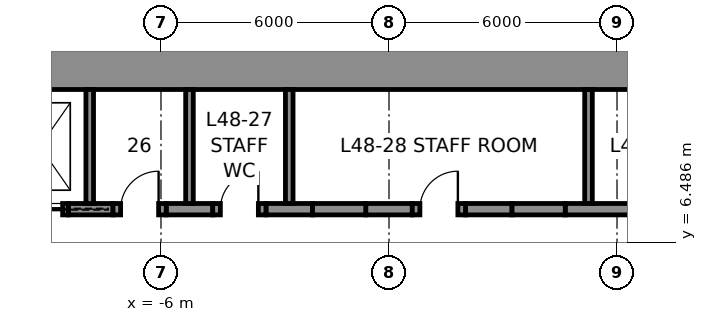
"""IFC4 building model, lengths in metres.
Left out: names, types, materials, properties, quantities, classifications, styles, units other than length and angle.
Written with IfcOpenShell. Run it as: python <this file> out.ifc"""

import sys

from ifc_helpers import new_model, si_unit, direction, frame, frame_2d, origin, place, context, subcontext, project, spatial, rectangle, extrude, element, fill, save


model = new_model("IFC4")
c1 = context("Model", 3, precision=1e-05, world=origin(), true_north=direction((0.0, 1.0)))
c2 = subcontext(c1, "Body", "Model", "MODEL_VIEW")
j1 = project(units=[si_unit("LENGTHUNIT", "METRE"), si_unit("PLANEANGLEUNIT", "RADIAN")], contexts=[c1])
p1 = place(None, origin())
s1 = spatial("IfcSite", under=j1, at=p1, CompositionType="ELEMENT")
p2 = place(p1, origin())
s2 = spatial("IfcBuilding", under=s1, at=p2, CompositionType="ELEMENT")
p3 = place(p2, frame((0.0, 0.0, 221.8)))
s3 = spatial("IfcBuildingStorey", under=s2, at=p3, CompositionType="ELEMENT", Elevation=221.8)
p4 = place(p3, frame((-12.0, 11.25, 0.0), z_axis=(0.0, 0.0, 1.0), x_axis=(1.0, 0.0, 0.0)))
e1 = element("IfcWall", 1, at=p4, inside=s3, PredefinedType="SHEAR", context=c2, shape_type="SweptSolid", body=[
    extrude(rectangle(XDim=24.0, YDim=1.5, at=frame_2d((12.0, 0.0))), origin(), (0.0, 0.0, 1.0), 4.0),
])
p5 = place(p3, frame((-8.438, 7.35, 0.0), z_axis=(0.0, 0.0, 1.0), x_axis=(1.0, 0.0, 0.0)))
e2 = element("IfcWall", 2, at=p5, inside=s3, PredefinedType="SHEAR", context=c2, shape_type="SweptSolid", body=[
    extrude(rectangle(XDim=1.175, YDim=0.3, at=frame_2d((0.587, 0.0))), origin(), (0.0, 0.0, 1.0), 4.0),
])
for number, where, z_axis, x_axis in (
    (3, (-5.863, 7.35, 0.0), (0.0, 0.0, 1.0), (1.0, 0.0, 0.0)),
    (4, (-3.238, 7.35, 0.0), (0.0, 0.0, 1.0), (1.0, 0.0, 0.0)),
    (5, (-0.613, 7.35, 0.0), (0.0, 0.0, 1.0), (1.0, 0.0, 0.0)),
    (6, (2.012, 7.35, 0.0), (0.0, 0.0, 1.0), (1.0, 0.0, 0.0)),
):
    element("IfcWall", number, at=place(p3, frame(where, z_axis=z_axis, x_axis=x_axis)), inside=s3, PredefinedType="SHEAR", context=c2, shape_type="SweptSolid", body=[
        extrude(rectangle(XDim=1.225, YDim=0.3, at=frame_2d((0.613, 0.0))), origin(), (0.0, 0.0, 1.0), 4.0),
    ])
p6 = place(p3, frame((4.637, 7.35, 0.0), z_axis=(0.0, 0.0, 1.0), x_axis=(1.0, 0.0, 0.0)))
e7 = element("IfcWall", 7, at=p6, inside=s3, PredefinedType="SHEAR", context=c2, shape_type="SweptSolid", body=[
    extrude(rectangle(XDim=1.887, YDim=0.3, at=frame_2d((0.944, 0.0))), origin(), (0.0, 0.0, 1.0), 4.0),
])
p7 = place(p3, frame((-9.938, 7.35, 0.0), z_axis=(0.0, 0.0, 1.0), x_axis=(1.0, 0.0, 0.0)))
e8 = element("IfcWall", 8, at=p7, inside=s3, PredefinedType="PARTITIONING", context=c2, shape_type="SweptSolid", body=[
    extrude(rectangle(XDim=1.5, YDim=0.3, at=frame_2d((0.75, 0.0))), origin(), (0.0, 0.0, 1.0), 4.0),
])
p8 = place(p7, frame((0.15, 0.0, 0.0)))
e9 = element("IfcOpeningElement", 9, at=p8, cuts=e8, PredefinedType="OPENING", context=c2, shape_type="SweptSolid", body=[
    extrude(rectangle(XDim=1.2, YDim=2.3, at=frame_2d((0.6, 1.15))), frame((0.0, 0.16, 0.0), z_axis=(0.0, -1.0, 0.0), x_axis=(1.0, 0.0, 0.0)), (0.0, 0.0, 1.0), 0.32),
])
p9 = place(p3, frame((-7.262, 7.35, 0.0), z_axis=(0.0, 0.0, 1.0), x_axis=(1.0, 0.0, 0.0)))
e10 = element("IfcWall", 10, at=p9, inside=s3, PredefinedType="PARTITIONING", context=c2, shape_type="SweptSolid", body=[
    extrude(rectangle(XDim=1.4, YDim=0.3, at=frame_2d((0.7, 0.0))), origin(), (0.0, 0.0, 1.0), 4.0),
])
p10 = place(p9, frame((0.2, 0.0, 0.0)))
e11 = element("IfcOpeningElement", 11, at=p10, cuts=e10, PredefinedType="OPENING", context=c2, shape_type="SweptSolid", body=[
    extrude(rectangle(XDim=1.0, YDim=2.3, at=frame_2d((0.5, 1.15))), frame((0.0, 0.16, 0.0), z_axis=(0.0, -1.0, 0.0), x_axis=(1.0, 0.0, 0.0)), (0.0, 0.0, 1.0), 0.32),
])
p11 = place(p3, frame((-4.637, 7.35, 0.0), z_axis=(0.0, 0.0, 1.0), x_axis=(1.0, 0.0, 0.0)))
e12 = element("IfcWall", 12, at=p11, inside=s3, PredefinedType="PARTITIONING", context=c2, shape_type="SweptSolid", body=[
    extrude(rectangle(XDim=1.4, YDim=0.3, at=frame_2d((0.7, 0.0))), origin(), (0.0, 0.0, 1.0), 4.0),
])
p12 = place(p11, frame((0.2, 0.0, 0.0)))
e13 = element("IfcOpeningElement", 13, at=p12, cuts=e12, PredefinedType="OPENING", context=c2, shape_type="SweptSolid", body=[
    extrude(rectangle(XDim=1.0, YDim=2.3, at=frame_2d((0.5, 1.15))), frame((0.0, 0.16, 0.0), z_axis=(0.0, -1.0, 0.0), x_axis=(1.0, 0.0, 0.0)), (0.0, 0.0, 1.0), 0.32),
])
p13 = place(p3, frame((-2.012, 7.35, 0.0), z_axis=(0.0, 0.0, 1.0), x_axis=(1.0, 0.0, 0.0)))
e14 = element("IfcWall", 14, at=p13, inside=s3, PredefinedType="PARTITIONING", context=c2, shape_type="SweptSolid", body=[
    extrude(rectangle(XDim=1.4, YDim=0.3, at=frame_2d((0.7, 0.0))), origin(), (0.0, 0.0, 1.0), 4.0),
])
p14 = place(p3, frame((0.613, 7.35, 0.0), z_axis=(0.0, 0.0, 1.0), x_axis=(1.0, 0.0, 0.0)))
e15 = element("IfcWall", 15, at=p14, inside=s3, PredefinedType="PARTITIONING", context=c2, shape_type="SweptSolid", body=[
    extrude(rectangle(XDim=1.4, YDim=0.3, at=frame_2d((0.7, 0.0))), origin(), (0.0, 0.0, 1.0), 4.0),
])
p15 = place(p14, frame((0.2, 0.0, 0.0)))
e16 = element("IfcOpeningElement", 16, at=p15, cuts=e15, PredefinedType="OPENING", context=c2, shape_type="SweptSolid", body=[
    extrude(rectangle(XDim=1.0, YDim=2.3, at=frame_2d((0.5, 1.15))), frame((0.0, 0.16, 0.0), z_axis=(0.0, -1.0, 0.0), x_axis=(1.0, 0.0, 0.0)), (0.0, 0.0, 1.0), 0.32),
])
p16 = place(p3, frame((3.238, 7.35, 0.0), z_axis=(0.0, 0.0, 1.0), x_axis=(1.0, 0.0, 0.0)))
e17 = element("IfcWall", 17, at=p16, inside=s3, PredefinedType="PARTITIONING", context=c2, shape_type="SweptSolid", body=[
    extrude(rectangle(XDim=1.4, YDim=0.3, at=frame_2d((0.7, 0.0))), origin(), (0.0, 0.0, 1.0), 4.0),
])
for number, where, z_axis, x_axis in (
    (18, (-7.875, 7.5, 0.0), (0.0, 0.0, 1.0), (0.0, 1.0, 0.0)),
    (19, (-5.25, 7.5, 0.0), (0.0, 0.0, 1.0), (0.0, 1.0, 0.0)),
    (20, (-2.625, 7.5, 0.0), (0.0, 0.0, 1.0), (0.0, 1.0, 0.0)),
    (21, (5.25, 7.5, 0.0), (0.0, 0.0, 1.0), (0.0, 1.0, 0.0)),
):
    element("IfcWall", number, at=place(p3, frame(where, z_axis=z_axis, x_axis=x_axis)), inside=s3, PredefinedType="PARTITIONING", context=c2, shape_type="SweptSolid", body=[
        extrude(rectangle(XDim=3.0, YDim=0.2, at=frame_2d((1.5, 0.0))), origin(), (0.0, 0.0, 1.0), 4.0),
    ])
p17 = place(p10, origin())
e22 = element("IfcDoor", 22, at=p17, inside=s3, OperationType="SINGLE_SWING_RIGHT", PredefinedType="DOOR", context=c2, shape_type="SweptSolid", body=[
    extrude(rectangle(XDim=1.0, YDim=2.3, at=frame_2d((0.5, 1.15))), frame((0.0, 0.025, 0.0), z_axis=(0.0, -1.0, 0.0), x_axis=(1.0, 0.0, 0.0)), (0.0, 0.0, 1.0), 0.05),
])
fill(e11, e22)
p18 = place(p12, origin())
e23 = element("IfcDoor", 23, at=p18, inside=s3, OperationType="SINGLE_SWING_RIGHT", PredefinedType="DOOR", context=c2, shape_type="SweptSolid", body=[
    extrude(rectangle(XDim=1.0, YDim=2.3, at=frame_2d((0.5, 1.15))), frame((0.0, 0.025, 0.0), z_axis=(0.0, -1.0, 0.0), x_axis=(1.0, 0.0, 0.0)), (0.0, 0.0, 1.0), 0.05),
])
fill(e13, e23)
p19 = place(p15, origin())
e24 = element("IfcDoor", 24, at=p19, inside=s3, OperationType="SINGLE_SWING_RIGHT", PredefinedType="DOOR", context=c2, shape_type="SweptSolid", body=[
    extrude(rectangle(XDim=1.0, YDim=2.3, at=frame_2d((0.5, 1.15))), frame((0.0, 0.025, 0.0), z_axis=(0.0, -1.0, 0.0), x_axis=(1.0, 0.0, 0.0)), (0.0, 0.0, 1.0), 0.05),
])
fill(e16, e24)
p20 = place(p8, frame((1.2, 0.0, 0.0), z_axis=(0.0, 0.0, 1.0), x_axis=(-1.0, 0.0, 0.0)))
e25 = element("IfcDoor", 25, at=p20, inside=s3, OperationType="SLIDING_TO_LEFT", PredefinedType="DOOR", context=c2, shape_type="SweptSolid", body=[
    extrude(rectangle(XDim=1.2, YDim=2.3, at=frame_2d((0.6, 1.15))), frame((0.0, 0.025, 0.0), z_axis=(0.0, -1.0, 0.0), x_axis=(1.0, 0.0, 0.0)), (0.0, 0.0, 1.0), 0.05),
])
fill(e9, e25)
save(model, sys.argv[1])
